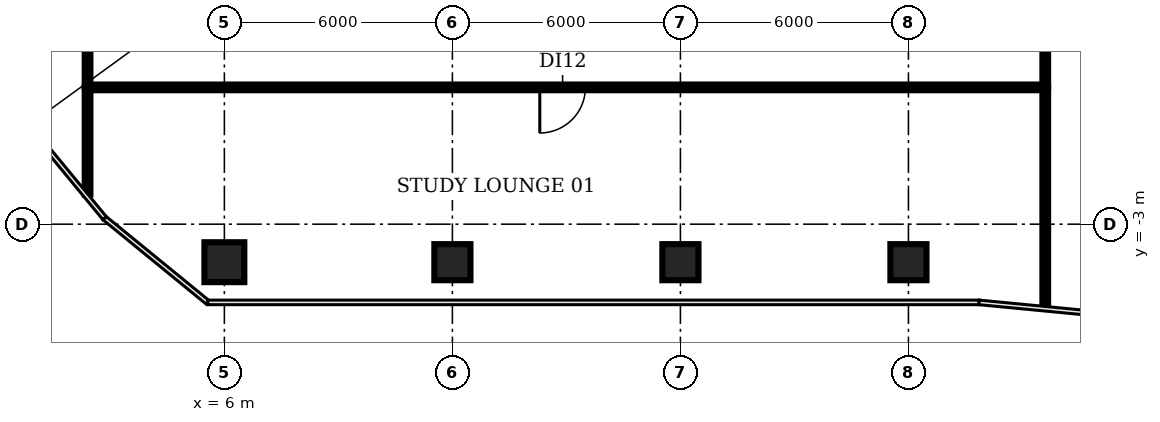
"""IFC4 building model, lengths in metres.
Left out: names, types, materials, properties, quantities, classifications, styles, units other than length and angle.
Written with IfcOpenShell. Run it as: python <this file> out.ifc"""

import sys

from ifc_helpers import new_model, si_unit, direction, frame, frame_2d, origin, origin_2d, place, context, subcontext, project, spatial, rectangle, circle, extrude, element, fill, save


model = new_model("IFC4")
c1 = context("Model", 3, precision=1e-05, world=origin(), true_north=direction((0.0, 1.0)))
c2 = subcontext(c1, "Body", "Model", "MODEL_VIEW")
j1 = project(units=[si_unit("LENGTHUNIT", "METRE"), si_unit("PLANEANGLEUNIT", "RADIAN")], contexts=[c1])
p1 = place(None, origin())
s1 = spatial("IfcSite", under=j1, at=p1, CompositionType="ELEMENT")
p2 = place(p1, origin())
s2 = spatial("IfcBuilding", under=s1, at=p2, CompositionType="ELEMENT")
p3 = place(p2, frame((0.0, 0.0, 29.0)))
s3 = spatial("IfcBuildingStorey", under=s2, at=p3, CompositionType="ELEMENT", Elevation=29.0)
p4 = place(p3, frame((6.0, -4.0, 0.0), z_axis=(0.0, 0.0, 1.0), x_axis=(1.0, 0.0, 0.0)))
e1 = element("IfcColumn", 1, at=p4, inside=s3, PredefinedType="COLUMN", context=c2, shape_type="SweptSolid", body=[
    extrude(circle(Radius=0.525, at=origin_2d()), origin(), (0.0, 0.0, 1.0), 3.85),
])
for number, where, z_axis, x_axis in (
    (2, (12.0, -4.0, 0.0), (0.0, 0.0, 1.0), (1.0, 0.0, 0.0)),
    (3, (18.0, -4.0, 0.0), (0.0, 0.0, 1.0), (1.0, 0.0, 0.0)),
    (4, (24.0, -4.0, 0.0), (0.0, 0.0, 1.0), (1.0, 0.0, 0.0)),
):
    element("IfcColumn", number, at=place(p3, frame(where, z_axis=z_axis, x_axis=x_axis)), inside=s3, PredefinedType="COLUMN", context=c2, shape_type="SweptSolid", body=[
        extrude(rectangle(XDim=0.95, YDim=0.95, at=origin_2d()), origin(), (0.0, 0.0, 1.0), 3.85),
    ])
p5 = place(p3, frame((2.4, -2.22, 0.0), z_axis=(0.0, 0.0, 1.0), x_axis=(0.0, 1.0, 0.0)))
e5 = element("IfcWall", 5, at=p5, inside=s3, PredefinedType="PARTITIONING", context=c2, shape_type="SweptSolid", body=[
    extrude(rectangle(XDim=2.82, YDim=0.15, at=frame_2d((1.41, 0.0))), origin(), (0.0, 0.0, 1.0), 2.83),
])
p6 = place(p3, frame((2.4, 0.6, 0.0), z_axis=(0.0, 0.0, 1.0), x_axis=(0.0, 1.0, 0.0)))
e6 = element("IfcWall", 6, at=p6, inside=s3, PredefinedType="PARTITIONING", context=c2, shape_type="SweptSolid", body=[
    extrude(rectangle(XDim=3.9, YDim=0.15, at=frame_2d((1.95, 0.0))), origin(), (0.0, 0.0, 1.0), 2.83),
])
p7 = place(p3, frame((27.6, -5.18, 0.0), z_axis=(0.0, 0.0, 1.0), x_axis=(0.0, 1.0, 0.0)))
e7 = element("IfcWall", 7, at=p7, inside=s3, PredefinedType="PARTITIONING", context=c2, shape_type="SweptSolid", body=[
    extrude(rectangle(XDim=5.78, YDim=0.15, at=frame_2d((2.89, 0.0))), origin(), (0.0, 0.0, 1.0), 2.83),
])
p8 = place(p3, frame((27.6, 0.6, 0.0), z_axis=(0.0, 0.0, 1.0), x_axis=(-1.0, 0.0, 0.0)))
e8 = element("IfcWall", 8, at=p8, inside=s3, PredefinedType="PARTITIONING", context=c2, shape_type="SweptSolid", body=[
    extrude(rectangle(XDim=25.2, YDim=0.15, at=frame_2d((12.6, 0.0))), origin(), (0.0, 0.0, 1.0), 2.83),
])
p9 = place(p8, frame((12.1, 0.0, 0.0)))
e9 = element("IfcOpeningElement", 9, at=p9, cuts=e8, PredefinedType="OPENING", context=c2, shape_type="SweptSolid", body=[
    extrude(rectangle(XDim=1.2, YDim=2.1, at=frame_2d((0.6, 1.05))), frame((0.0, 0.085, 0.0), z_axis=(0.0, -1.0, 0.0), x_axis=(1.0, 0.0, 0.0)), (0.0, 0.0, 1.0), 0.17),
])
p10 = place(p3, frame((27.6, 0.6, 0.0), z_axis=(0.0, 0.0, 1.0), x_axis=(0.0, 1.0, 0.0)))
e10 = element("IfcWall", 10, at=p10, inside=s3, PredefinedType="PARTITIONING", context=c2, shape_type="SweptSolid", body=[
    extrude(rectangle(XDim=14.4, YDim=0.15, at=frame_2d((7.2, 0.0))), origin(), (0.0, 0.0, 1.0), 2.83),
])
p11 = place(p9, origin())
e11 = element("IfcDoor", 11, at=p11, inside=s3, OperationType="SINGLE_SWING_RIGHT", PredefinedType="DOOR", context=c2, shape_type="SweptSolid", body=[
    extrude(rectangle(XDim=1.2, YDim=2.1, at=frame_2d((0.6, 1.05))), frame((0.0, 0.025, 0.0), z_axis=(0.0, -1.0, 0.0), x_axis=(1.0, 0.0, 0.0)), (0.0, 0.0, 1.0), 0.05),
])
fill(e9, e11)
save(model, sys.argv[1])
